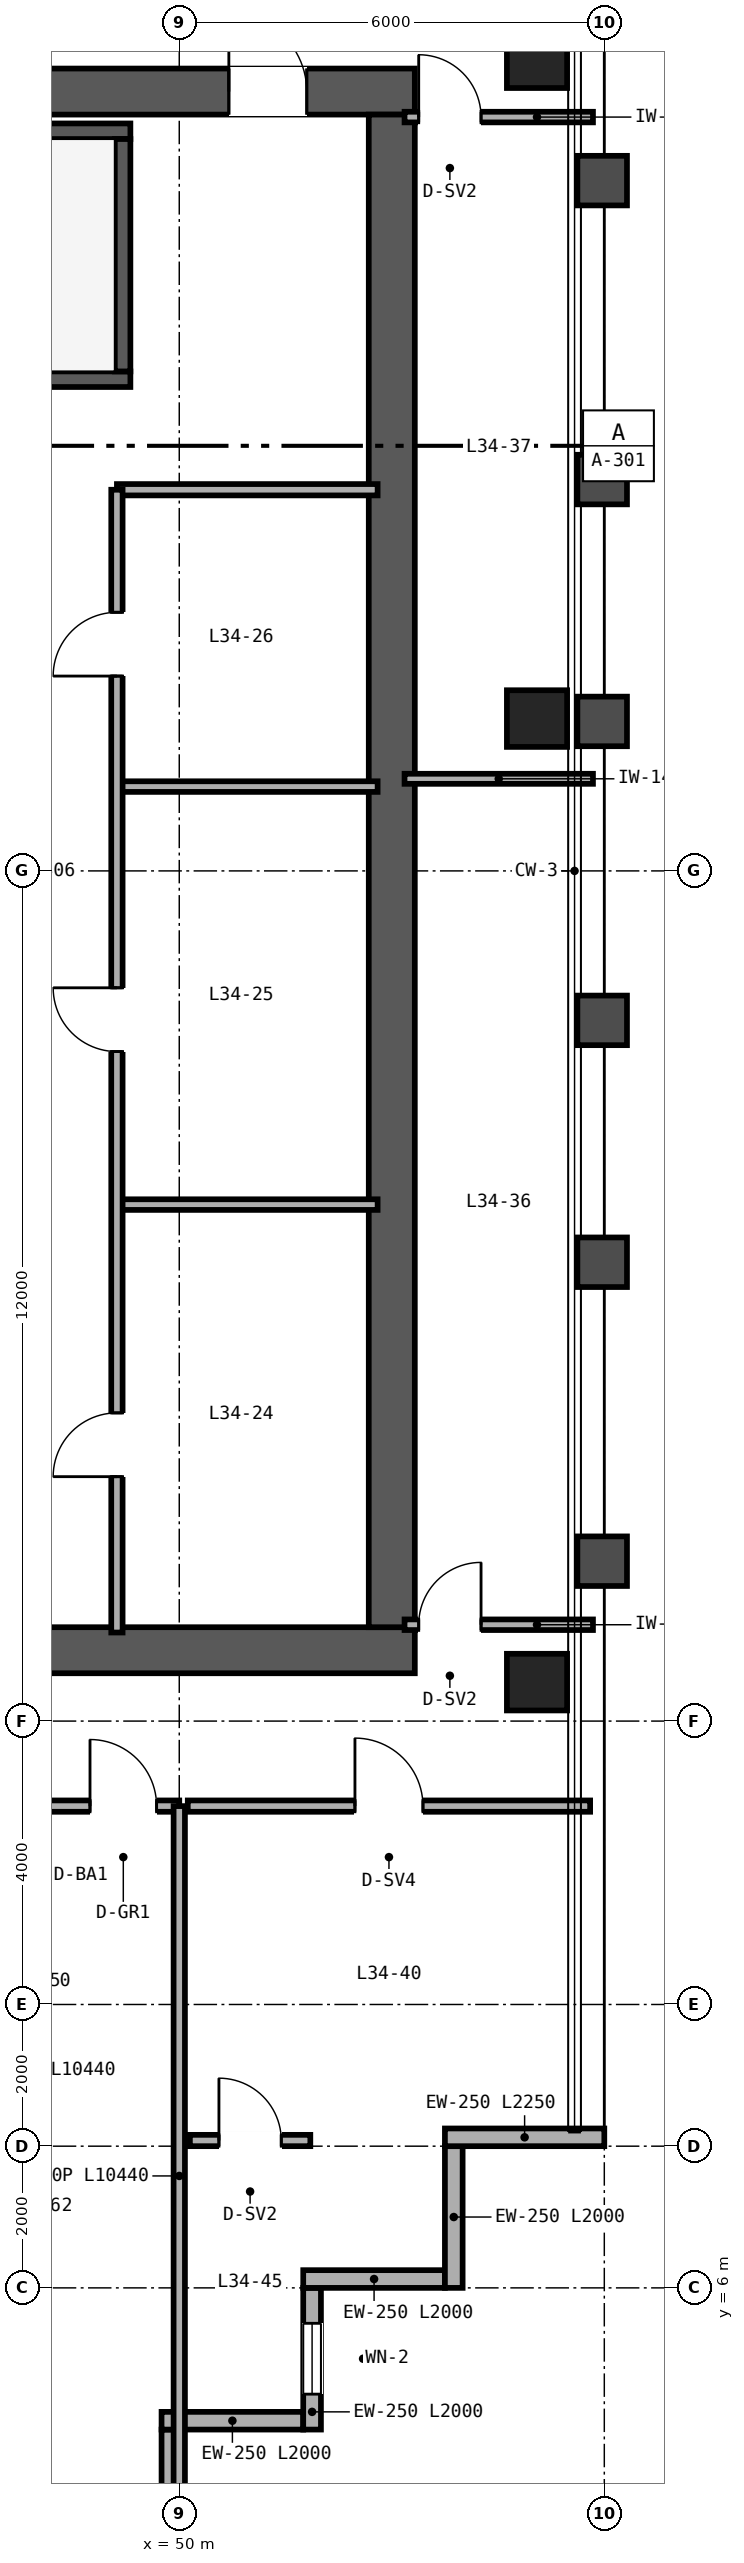
"""IFC4 building model, lengths in metres.
Left out: names, types, materials, properties, quantities, classifications, styles, units other than length and angle.
Written with IfcOpenShell. Run it as: python <this file> out.ifc"""

import sys

from ifc_helpers import new_model, si_unit, direction, frame, frame_2d, origin, origin_2d, place, context, subcontext, project, spatial, rectangle, hollow_rectangle, extrude, source, transform, mapped, element, fill, save


model = new_model("IFC4")
c1 = context("Model", 3, precision=1e-05, world=origin(), true_north=direction((0.0, 1.0)))
c2 = subcontext(c1, "Body", "Model", "MODEL_VIEW")
j1 = project(units=[si_unit("LENGTHUNIT", "METRE"), si_unit("PLANEANGLEUNIT", "RADIAN")], contexts=[c1])
p1 = place(None, origin())
s1 = spatial("IfcSite", under=j1, at=p1, CompositionType="ELEMENT")
p2 = place(p1, origin())
s2 = spatial("IfcBuilding", under=s1, at=p2, CompositionType="ELEMENT")
p3 = place(p2, frame((0.0, 0.0, 136.8)))
s3 = spatial("IfcBuildingStorey", under=s2, at=p3, CompositionType="ELEMENT", Elevation=136.8)
p4 = place(p3, frame((40.675, 15.0, 0.0), z_axis=(0.0, 0.0, 1.0), x_axis=(1.0, 0.0, 0.0)))
e1 = element("IfcWall", 1, at=p4, inside=s3, PredefinedType="SHEAR", context=c2, shape_type="SweptSolid", body=[
    extrude(rectangle(XDim=12.65, YDim=0.65, at=frame_2d((6.325, 0.0))), origin(), (0.0, 0.0, 1.0), 3.36),
])
p5 = place(p4, frame((4.425, 0.0, 0.0)))
e2 = element("IfcOpeningElement", 2, at=p5, cuts=e1, PredefinedType="OPENING", context=c2, shape_type="SweptSolid", body=[
    extrude(rectangle(XDim=1.0, YDim=2.15, at=frame_2d((0.5, 1.075))), frame((0.0, 0.335, 0.0), z_axis=(0.0, -1.0, 0.0), x_axis=(1.0, 0.0, 0.0)), (0.0, 0.0, 1.0), 0.67),
])
p6 = place(p3, frame((40.675, 37.0, 0.0), z_axis=(0.0, 0.0, 1.0), x_axis=(1.0, 0.0, 0.0)))
e3 = element("IfcWall", 3, at=p6, inside=s3, PredefinedType="SHEAR", context=c2, shape_type="SweptSolid", body=[
    extrude(rectangle(XDim=12.65, YDim=0.65, at=frame_2d((6.325, 0.0))), origin(), (0.0, 0.0, 1.0), 3.36),
])
p7 = place(p6, frame((10.025, 0.0, 0.0)))
e4 = element("IfcOpeningElement", 4, at=p7, cuts=e3, PredefinedType="OPENING", context=c2, shape_type="SweptSolid", body=[
    extrude(rectangle(XDim=1.1, YDim=2.15, at=frame_2d((0.55, 1.075))), frame((0.0, 0.335, 0.0), z_axis=(0.0, -1.0, 0.0), x_axis=(1.0, 0.0, 0.0)), (0.0, 0.0, 1.0), 0.67),
])
p8 = place(p3, frame((53.0, 15.325, 0.0), z_axis=(0.0, 0.0, 1.0), x_axis=(0.0, 1.0, 0.0)))
e5 = element("IfcWall", 5, at=p8, inside=s3, PredefinedType="SHEAR", context=c2, shape_type="SweptSolid", body=[
    extrude(rectangle(XDim=21.35, YDim=0.65, at=frame_2d((10.675, 0.0))), origin(), (0.0, 0.0, 1.0), 3.36),
])
p9 = place(p3, frame((41.325, 32.94, 0.0), z_axis=(0.0, 0.0, 1.0), x_axis=(1.0, 0.0, 0.0)))
e6 = element("IfcWall", 6, at=p9, inside=s3, PredefinedType="SHEAR", context=c2, shape_type="SweptSolid", body=[
    extrude(rectangle(XDim=7.985, YDim=0.22, at=frame_2d((3.993, 0.0))), origin(), (0.0, 0.0, 1.0), 3.4),
])
p10 = place(p9, frame((0.595, 0.0, 0.0)))
e7 = element("IfcOpeningElement", 7, at=p10, cuts=e6, PredefinedType="OPENING", context=c2, shape_type="SweptSolid", body=[
    extrude(rectangle(XDim=1.05, YDim=2.15, at=frame_2d((0.525, 1.075))), frame((0.0, 0.12, 0.0), z_axis=(0.0, -1.0, 0.0), x_axis=(1.0, 0.0, 0.0)), (0.0, 0.0, 1.0), 0.24),
])
p11 = place(p3, frame((41.325, 36.44, 0.0), z_axis=(0.0, 0.0, 1.0), x_axis=(1.0, 0.0, 0.0)))
e8 = element("IfcWall", 8, at=p11, inside=s3, PredefinedType="SHEAR", context=c2, shape_type="SweptSolid", body=[
    extrude(rectangle(XDim=7.985, YDim=0.22, at=frame_2d((3.993, 0.0))), origin(), (0.0, 0.0, 1.0), 3.4),
])
p12 = place(p3, frame((49.2, 33.05, 0.0), z_axis=(0.0, 0.0, 1.0), x_axis=(0.0, 1.0, 0.0)))
e9 = element("IfcWall", 9, at=p12, inside=s3, PredefinedType="SHEAR", context=c2, shape_type="SweptSolid", body=[
    extrude(rectangle(XDim=3.28, YDim=0.22, at=frame_2d((1.64, 0.0))), origin(), (0.0, 0.0, 1.0), 3.4),
])
m1 = source(origin(), c2, "Body", "SweptSolid", [
    extrude(hollow_rectangle(XDim=0.85, YDim=0.8, WallThickness=0.032, at=origin_2d()), origin(), (0.0, 0.0, 1.0), 3.36),
])
for number, where, z_axis, x_axis in (
    (10, (55.05, 14.55, 0.0), (0.0, 0.0, 1.0), (1.0, 0.0, 0.0)),
    (11, (55.05, 28.15, 0.0), (0.0, 0.0, 1.0), (1.0, 0.0, 0.0)),
    (12, (55.05, 37.45, 0.0), (0.0, 0.0, 1.0), (1.0, 0.0, 0.0)),
):
    element("IfcColumn", number, at=place(p3, frame(where, z_axis=z_axis, x_axis=x_axis)), inside=s3, PredefinedType="COLUMN", context=c2, shape_type="MappedRepresentation", body=[
        mapped(m1, transform((0.0, 0.0, 0.0), scale=1.0)),
    ])
p13 = place(p3, frame((49.875, 2.0, 0.0), z_axis=(0.0, 0.0, 1.0), x_axis=(0.0, 1.0, 0.0)))
e13 = element("IfcWall", 13, at=p13, inside=s3, PredefinedType="SOLIDWALL", context=c2, shape_type="SweptSolid", body=[
    extrude(rectangle(XDim=2.0, YDim=0.25, at=frame_2d((1.0, 0.0))), origin(), (0.0, 0.0, 1.0), 2.667),
])
p14 = place(p3, frame((49.75, 4.125, 0.0), z_axis=(0.0, 0.0, 1.0), x_axis=(1.0, 0.0, 0.0)))
e14 = element("IfcWall", 14, at=p14, inside=s3, PredefinedType="SOLIDWALL", context=c2, shape_type="SweptSolid", body=[
    extrude(rectangle(XDim=2.0, YDim=0.25, at=frame_2d((1.0, 0.0))), origin(), (0.0, 0.0, 1.0), 3.36),
])
p15 = place(p3, frame((51.875, 4.0, 0.0), z_axis=(0.0, 0.0, 1.0), x_axis=(0.0, 1.0, 0.0)))
e15 = element("IfcWall", 15, at=p15, inside=s3, PredefinedType="SOLIDWALL", context=c2, shape_type="SweptSolid", body=[
    extrude(rectangle(XDim=2.0, YDim=0.25, at=frame_2d((1.0, 0.0))), origin(), (0.0, 0.0, 1.0), 3.36),
])
p16 = place(p15, frame((0.5, 0.0, 0.85)))
e16 = element("IfcOpeningElement", 16, at=p16, cuts=e15, PredefinedType="OPENING", context=c2, shape_type="SweptSolid", body=[
    extrude(rectangle(XDim=1.0, YDim=1.9, at=frame_2d((0.5, 0.95))), frame((0.0, 0.135, 0.0), z_axis=(0.0, -1.0, 0.0), x_axis=(1.0, 0.0, 0.0)), (0.0, 0.0, 1.0), 0.27),
])
for number, where, z_axis, x_axis in (
    (17, (51.75, 6.125, 0.0), (0.0, 0.0, 1.0), (1.0, 0.0, 0.0)),
    (18, (53.875, 6.0, 0.0), (0.0, 0.0, 1.0), (0.0, 1.0, 0.0)),
):
    element("IfcWall", number, at=place(p3, frame(where, z_axis=z_axis, x_axis=x_axis)), inside=s3, PredefinedType="SOLIDWALL", context=c2, shape_type="SweptSolid", body=[
        extrude(rectangle(XDim=2.0, YDim=0.25, at=frame_2d((1.0, 0.0))), origin(), (0.0, 0.0, 1.0), 3.36),
    ])
p17 = place(p3, frame((53.75, 8.125, 0.0), z_axis=(0.0, 0.0, 1.0), x_axis=(1.0, 0.0, 0.0)))
e19 = element("IfcWall", 19, at=p17, inside=s3, PredefinedType="SOLIDWALL", context=c2, shape_type="SweptSolid", body=[
    extrude(rectangle(XDim=2.25, YDim=0.25, at=frame_2d((1.125, 0.0))), origin(), (0.0, 0.0, 1.0), 3.36),
])
p18 = place(p3, frame((49.12, 31.38, 0.0), z_axis=(0.0, 0.0, 1.0), x_axis=(1.0, 0.0, 0.0)))
e20 = element("IfcWall", 20, at=p18, inside=s3, PredefinedType="PARTITIONING", context=c2, shape_type="SweptSolid", body=[
    extrude(rectangle(XDim=3.68, YDim=0.16, at=frame_2d((1.84, 0.0))), origin(), (0.0, 0.0, 1.0), 2.36),
])
for number, where, z_axis, x_axis in (
    (21, (49.12, 21.29, 0.0), (0.0, 0.0, 1.0), (1.0, 0.0, 0.0)),
    (22, (49.12, 27.19, 0.0), (0.0, 0.0, 1.0), (1.0, 0.0, 0.0)),
):
    element("IfcWall", number, at=place(p3, frame(where, z_axis=z_axis, x_axis=x_axis)), inside=s3, PredefinedType="PARTITIONING", context=c2, shape_type="SweptSolid", body=[
        extrude(rectangle(XDim=3.68, YDim=0.15, at=frame_2d((1.84, 0.0))), origin(), (0.0, 0.0, 1.0), 3.36),
    ])
p19 = place(p3, frame((49.12, 15.25, 0.0), z_axis=(0.0, 0.0, 1.0), x_axis=(0.0, 1.0, 0.0)))
e23 = element("IfcWall", 23, at=p19, inside=s3, PredefinedType="PARTITIONING", context=c2, shape_type="SweptSolid", body=[
    extrude(rectangle(XDim=16.13, YDim=0.16, at=frame_2d((8.065, 0.0))), origin(), (0.0, 0.0, 1.0), 2.36),
])
p20 = place(p19, frame((2.2, 0.0, 0.0)))
e24 = element("IfcOpeningElement", 24, at=p20, cuts=e23, PredefinedType="OPENING", context=c2, shape_type="SweptSolid", body=[
    extrude(rectangle(XDim=0.9, YDim=2.15, at=frame_2d((0.45, 1.075))), frame((0.0, 0.09, 0.0), z_axis=(0.0, -1.0, 0.0), x_axis=(1.0, 0.0, 0.0)), (0.0, 0.0, 1.0), 0.18),
])
p21 = place(p19, frame((8.2, 0.0, 0.0)))
e25 = element("IfcOpeningElement", 25, at=p21, cuts=e23, PredefinedType="OPENING", context=c2, shape_type="SweptSolid", body=[
    extrude(rectangle(XDim=0.9, YDim=2.15, at=frame_2d((0.45, 1.075))), frame((0.0, 0.09, 0.0), z_axis=(0.0, -1.0, 0.0), x_axis=(1.0, 0.0, 0.0)), (0.0, 0.0, 1.0), 0.18),
])
p22 = place(p19, frame((13.5, 0.0, 0.0)))
e26 = element("IfcOpeningElement", 26, at=p22, cuts=e23, PredefinedType="OPENING", context=c2, shape_type="SweptSolid", body=[
    extrude(rectangle(XDim=0.9, YDim=2.15, at=frame_2d((0.45, 1.075))), frame((0.0, 0.09, 0.0), z_axis=(0.0, -1.0, 0.0), x_axis=(1.0, 0.0, 0.0)), (0.0, 0.0, 1.0), 0.18),
])
p23 = place(p3, frame((53.18, 15.36, 0.0), z_axis=(0.0, 0.0, 1.0), x_axis=(1.0, 0.0, 0.0)))
e27 = element("IfcWall", 27, at=p23, inside=s3, PredefinedType="PARTITIONING", context=c2, shape_type="SweptSolid", body=[
    extrude(rectangle(XDim=2.66, YDim=0.15, at=frame_2d((1.33, 0.0))), origin(), (0.0, 0.0, 1.0), 2.581),
])
p24 = place(p23, frame((0.2, 0.0, 0.0)))
e28 = element("IfcOpeningElement", 28, at=p24, cuts=e27, PredefinedType="OPENING", context=c2, shape_type="SweptSolid", body=[
    extrude(rectangle(XDim=0.88, YDim=2.15, at=frame_2d((0.44, 1.075))), frame((0.0, 0.085, 0.0), z_axis=(0.0, -1.0, 0.0), x_axis=(1.0, 0.0, 0.0)), (0.0, 0.0, 1.0), 0.17),
])
p25 = place(p3, frame((53.18, 36.64, 0.0), z_axis=(0.0, 0.0, 1.0), x_axis=(1.0, 0.0, 0.0)))
e29 = element("IfcWall", 29, at=p25, inside=s3, PredefinedType="PARTITIONING", context=c2, shape_type="SweptSolid", body=[
    extrude(rectangle(XDim=2.66, YDim=0.15, at=frame_2d((1.33, 0.0))), origin(), (0.0, 0.0, 1.0), 2.743),
])
p26 = place(p25, frame((0.2, 0.0, 0.0)))
e30 = element("IfcOpeningElement", 30, at=p26, cuts=e29, PredefinedType="OPENING", context=c2, shape_type="SweptSolid", body=[
    extrude(rectangle(XDim=0.88, YDim=2.15, at=frame_2d((0.44, 1.075))), frame((0.0, 0.085, 0.0), z_axis=(0.0, -1.0, 0.0), x_axis=(1.0, 0.0, 0.0)), (0.0, 0.0, 1.0), 0.17),
])
p27 = place(p3, frame((53.18, 27.3, 0.0), z_axis=(0.0, 0.0, 1.0), x_axis=(1.0, 0.0, 0.0)))
e31 = element("IfcWall", 31, at=p27, inside=s3, PredefinedType="PARTITIONING", context=c2, shape_type="SweptSolid", body=[
    extrude(rectangle(XDim=2.66, YDim=0.142, at=frame_2d((1.33, 0.0))), origin(), (0.0, 0.0, 1.0), 2.581),
])
p28 = place(p3, frame((50.12, 12.8, 0.0), z_axis=(0.0, 0.0, 1.0), x_axis=(1.0, 0.0, 0.0)))
e32 = element("IfcWall", 32, at=p28, inside=s3, PredefinedType="PARTITIONING", context=c2, shape_type="SweptSolid", body=[
    extrude(rectangle(XDim=5.68, YDim=0.16, at=frame_2d((2.84, 0.0))), origin(), (0.0, 0.0, 1.0), 3.36),
])
p29 = place(p28, frame((2.36, 0.0, 0.0)))
e33 = element("IfcOpeningElement", 33, at=p29, cuts=e32, PredefinedType="OPENING", context=c2, shape_type="SweptSolid", body=[
    extrude(rectangle(XDim=0.96, YDim=2.15, at=frame_2d((0.48, 1.075))), frame((0.0, 0.09, 0.0), z_axis=(0.0, -1.0, 0.0), x_axis=(1.0, 0.0, 0.0)), (0.0, 0.0, 1.0), 0.18),
])
p30 = place(p3, frame((50.15, 8.08, 0.0), z_axis=(0.0, 0.0, 1.0), x_axis=(1.0, 0.0, 0.0)))
e34 = element("IfcWall", 34, at=p30, inside=s3, PredefinedType="PARTITIONING", context=c2, shape_type="SweptSolid", body=[
    extrude(rectangle(XDim=1.7, YDim=0.16, at=frame_2d((0.85, 0.0))), origin(), (0.0, 0.0, 1.0), 3.36),
])
p31 = place(p30, frame((0.41, 0.0, 0.0)))
e35 = element("IfcOpeningElement", 35, at=p31, cuts=e34, PredefinedType="OPENING", context=c2, shape_type="SweptSolid", body=[
    extrude(rectangle(XDim=0.88, YDim=2.15, at=frame_2d((0.44, 1.075))), frame((0.0, 0.09, 0.0), z_axis=(0.0, -1.0, 0.0), x_axis=(1.0, 0.0, 0.0)), (0.0, 0.0, 1.0), 0.18),
])
p32 = place(p3, frame((14.0, 12.8, 0.0), z_axis=(0.0, 0.0, 1.0), x_axis=(1.0, 0.0, 0.0)))
e36 = element("IfcWall", 36, at=p32, inside=s3, PredefinedType="PARTITIONING", context=c2, shape_type="SweptSolid", body=[
    extrude(rectangle(XDim=36.0, YDim=0.16, at=frame_2d((18.0, 0.0))), origin(), (0.0, 0.0, 1.0), 2.581),
])
p33 = place(p32, frame((2.64, 0.0, 0.0)))
e37 = element("IfcOpeningElement", 37, at=p33, cuts=e36, PredefinedType="OPENING", context=c2, shape_type="SweptSolid", body=[
    extrude(rectangle(XDim=0.94, YDim=2.15, at=frame_2d((0.47, 1.075))), frame((0.0, 0.09, 0.0), z_axis=(0.0, -1.0, 0.0), x_axis=(1.0, 0.0, 0.0)), (0.0, 0.0, 1.0), 0.18),
])
p34 = place(p32, frame((6.54, 0.0, 0.0)))
e38 = element("IfcOpeningElement", 38, at=p34, cuts=e36, PredefinedType="OPENING", context=c2, shape_type="SweptSolid", body=[
    extrude(rectangle(XDim=0.94, YDim=2.15, at=frame_2d((0.47, 1.075))), frame((0.0, 0.09, 0.0), z_axis=(0.0, -1.0, 0.0), x_axis=(1.0, 0.0, 0.0)), (0.0, 0.0, 1.0), 0.18),
])
p35 = place(p32, frame((10.54, 0.0, 0.0)))
e39 = element("IfcOpeningElement", 39, at=p35, cuts=e36, PredefinedType="OPENING", context=c2, shape_type="SweptSolid", body=[
    extrude(rectangle(XDim=0.94, YDim=2.15, at=frame_2d((0.47, 1.075))), frame((0.0, 0.09, 0.0), z_axis=(0.0, -1.0, 0.0), x_axis=(1.0, 0.0, 0.0)), (0.0, 0.0, 1.0), 0.18),
])
p36 = place(p32, frame((14.54, 0.0, 0.0)))
e40 = element("IfcOpeningElement", 40, at=p36, cuts=e36, PredefinedType="OPENING", context=c2, shape_type="SweptSolid", body=[
    extrude(rectangle(XDim=0.94, YDim=2.15, at=frame_2d((0.47, 1.075))), frame((0.0, 0.09, 0.0), z_axis=(0.0, -1.0, 0.0), x_axis=(1.0, 0.0, 0.0)), (0.0, 0.0, 1.0), 0.18),
])
p37 = place(p32, frame((18.54, 0.0, 0.0)))
e41 = element("IfcOpeningElement", 41, at=p37, cuts=e36, PredefinedType="OPENING", context=c2, shape_type="SweptSolid", body=[
    extrude(rectangle(XDim=0.94, YDim=2.15, at=frame_2d((0.47, 1.075))), frame((0.0, 0.09, 0.0), z_axis=(0.0, -1.0, 0.0), x_axis=(1.0, 0.0, 0.0)), (0.0, 0.0, 1.0), 0.18),
])
p38 = place(p32, frame((22.54, 0.0, 0.0)))
e42 = element("IfcOpeningElement", 42, at=p38, cuts=e36, PredefinedType="OPENING", context=c2, shape_type="SweptSolid", body=[
    extrude(rectangle(XDim=0.94, YDim=2.15, at=frame_2d((0.47, 1.075))), frame((0.0, 0.09, 0.0), z_axis=(0.0, -1.0, 0.0), x_axis=(1.0, 0.0, 0.0)), (0.0, 0.0, 1.0), 0.18),
])
p39 = place(p32, frame((26.54, 0.0, 0.0)))
e43 = element("IfcOpeningElement", 43, at=p39, cuts=e36, PredefinedType="OPENING", context=c2, shape_type="SweptSolid", body=[
    extrude(rectangle(XDim=0.94, YDim=2.15, at=frame_2d((0.47, 1.075))), frame((0.0, 0.09, 0.0), z_axis=(0.0, -1.0, 0.0), x_axis=(1.0, 0.0, 0.0)), (0.0, 0.0, 1.0), 0.18),
])
p40 = place(p32, frame((30.64, 0.0, 0.0)))
e44 = element("IfcOpeningElement", 44, at=p40, cuts=e36, PredefinedType="OPENING", context=c2, shape_type="SweptSolid", body=[
    extrude(rectangle(XDim=0.94, YDim=2.15, at=frame_2d((0.47, 1.075))), frame((0.0, 0.09, 0.0), z_axis=(0.0, -1.0, 0.0), x_axis=(1.0, 0.0, 0.0)), (0.0, 0.0, 1.0), 0.18),
])
p41 = place(p32, frame((34.74, 0.0, 0.0)))
e45 = element("IfcOpeningElement", 45, at=p41, cuts=e36, PredefinedType="OPENING", context=c2, shape_type="SweptSolid", body=[
    extrude(rectangle(XDim=0.94, YDim=2.15, at=frame_2d((0.47, 1.075))), frame((0.0, 0.09, 0.0), z_axis=(0.0, -1.0, 0.0), x_axis=(1.0, 0.0, 0.0)), (0.0, 0.0, 1.0), 0.18),
])
p42 = place(p3, frame((50.0, 2.36, 0.0), z_axis=(0.0, 0.0, 1.0), x_axis=(0.0, 1.0, 0.0)))
e46 = element("IfcWall", 46, at=p42, inside=s3, PredefinedType="PARTITIONING", context=c2, shape_type="SweptSolid", body=[
    extrude(rectangle(XDim=10.44, YDim=0.16, at=frame_2d((5.22, 0.0))), origin(), (0.0, 0.0, 1.0), 2.667),
])
m2 = source(origin(), c2, "Body", "SweptSolid", [
    extrude(rectangle(XDim=1.0, YDim=1.9, at=frame_2d((0.5, 0.95))), frame((0.0, 0.03, 0.0), z_axis=(0.0, -1.0, 0.0), x_axis=(1.0, 0.0, 0.0)), (0.0, 0.0, 1.0), 0.06),
])
p43 = place(p16, origin())
e47 = element("IfcWindow", 47, at=p43, inside=s3, PartitioningType="SINGLE_PANEL", PredefinedType="WINDOW", context=c2, shape_type="MappedRepresentation", body=[
    mapped(m2, transform((0.0, 0.0, 0.0), scale=1.0)),
])
fill(e16, e47)
m3 = source(origin(), c2, "Body", "SweptSolid", [
    extrude(rectangle(XDim=1.1, YDim=2.15, at=frame_2d((0.55, 1.075))), frame((0.0, 0.025, 0.0), z_axis=(0.0, -1.0, 0.0), x_axis=(1.0, 0.0, 0.0)), (0.0, 0.0, 1.0), 0.05),
])
p44 = place(p7, origin())
e48 = element("IfcDoor", 48, at=p44, inside=s3, OperationType="SINGLE_SWING_LEFT", PredefinedType="DOOR", context=c2, shape_type="MappedRepresentation", body=[
    mapped(m3, transform((0.0, 0.0, 0.0), scale=1.0)),
])
fill(e4, e48)
m4 = source(origin(), c2, "Body", "SweptSolid", [
    extrude(rectangle(XDim=0.9, YDim=2.15, at=frame_2d((0.45, 1.075))), frame((0.0, 0.025, 0.0), z_axis=(0.0, -1.0, 0.0), x_axis=(1.0, 0.0, 0.0)), (0.0, 0.0, 1.0), 0.05),
])
p45 = place(p20, origin())
e49 = element("IfcDoor", 49, at=p45, inside=s3, OperationType="SINGLE_SWING_LEFT", PredefinedType="DOOR", context=c2, shape_type="MappedRepresentation", body=[
    mapped(m4, transform((0.0, 0.0, 0.0), scale=1.0)),
])
fill(e24, e49)
p46 = place(p21, origin())
e50 = element("IfcDoor", 50, at=p46, inside=s3, OperationType="SINGLE_SWING_RIGHT", PredefinedType="DOOR", context=c2, shape_type="MappedRepresentation", body=[
    mapped(m4, transform((0.0, 0.0, 0.0), scale=1.0)),
])
fill(e25, e50)
p47 = place(p22, origin())
e51 = element("IfcDoor", 51, at=p47, inside=s3, OperationType="SINGLE_SWING_LEFT", PredefinedType="DOOR", context=c2, shape_type="MappedRepresentation", body=[
    mapped(m4, transform((0.0, 0.0, 0.0), scale=1.0)),
])
fill(e26, e51)
m5 = source(origin(), c2, "Body", "SweptSolid", [
    extrude(rectangle(XDim=0.88, YDim=2.15, at=frame_2d((0.44, 1.075))), frame((0.0, 0.025, 0.0), z_axis=(0.0, -1.0, 0.0), x_axis=(1.0, 0.0, 0.0)), (0.0, 0.0, 1.0), 0.05),
])
p48 = place(p24, origin())
e52 = element("IfcDoor", 52, at=p48, inside=s3, OperationType="SINGLE_SWING_RIGHT", PredefinedType="DOOR", context=c2, shape_type="MappedRepresentation", body=[
    mapped(m5, transform((0.0, 0.0, 0.0), scale=1.0)),
])
fill(e28, e52)
p49 = place(p26, origin())
e53 = element("IfcDoor", 53, at=p49, inside=s3, OperationType="SINGLE_SWING_LEFT", PredefinedType="DOOR", context=c2, shape_type="MappedRepresentation", body=[
    mapped(m5, transform((0.0, 0.0, 0.0), scale=1.0)),
])
fill(e30, e53)
m6 = source(origin(), c2, "Body", "SweptSolid", [
    extrude(rectangle(XDim=0.96, YDim=2.15, at=frame_2d((0.48, 1.075))), frame((0.0, 0.025, 0.0), z_axis=(0.0, -1.0, 0.0), x_axis=(1.0, 0.0, 0.0)), (0.0, 0.0, 1.0), 0.05),
])
p50 = place(p29, origin())
e54 = element("IfcDoor", 54, at=p50, inside=s3, OperationType="SINGLE_SWING_LEFT", PredefinedType="DOOR", context=c2, shape_type="MappedRepresentation", body=[
    mapped(m6, transform((0.0, 0.0, 0.0), scale=1.0)),
])
fill(e33, e54)
p51 = place(p31, origin())
e55 = element("IfcDoor", 55, at=p51, inside=s3, OperationType="SINGLE_SWING_LEFT", PredefinedType="DOOR", context=c2, shape_type="MappedRepresentation", body=[
    mapped(m5, transform((0.0, 0.0, 0.0), scale=1.0)),
])
fill(e35, e55)
m7 = source(origin(), c2, "Body", "SweptSolid", [
    extrude(rectangle(XDim=0.94, YDim=2.15, at=frame_2d((0.47, 1.075))), frame((0.0, 0.025, 0.0), z_axis=(0.0, -1.0, 0.0), x_axis=(1.0, 0.0, 0.0)), (0.0, 0.0, 1.0), 0.05),
])
p52 = place(p41, origin())
e56 = element("IfcDoor", 56, at=p52, inside=s3, OperationType="SINGLE_SWING_LEFT", PredefinedType="DOOR", context=c2, shape_type="MappedRepresentation", body=[
    mapped(m7, transform((0.0, 0.0, 0.0), scale=1.0)),
])
fill(e45, e56)
save(model, sys.argv[1])
